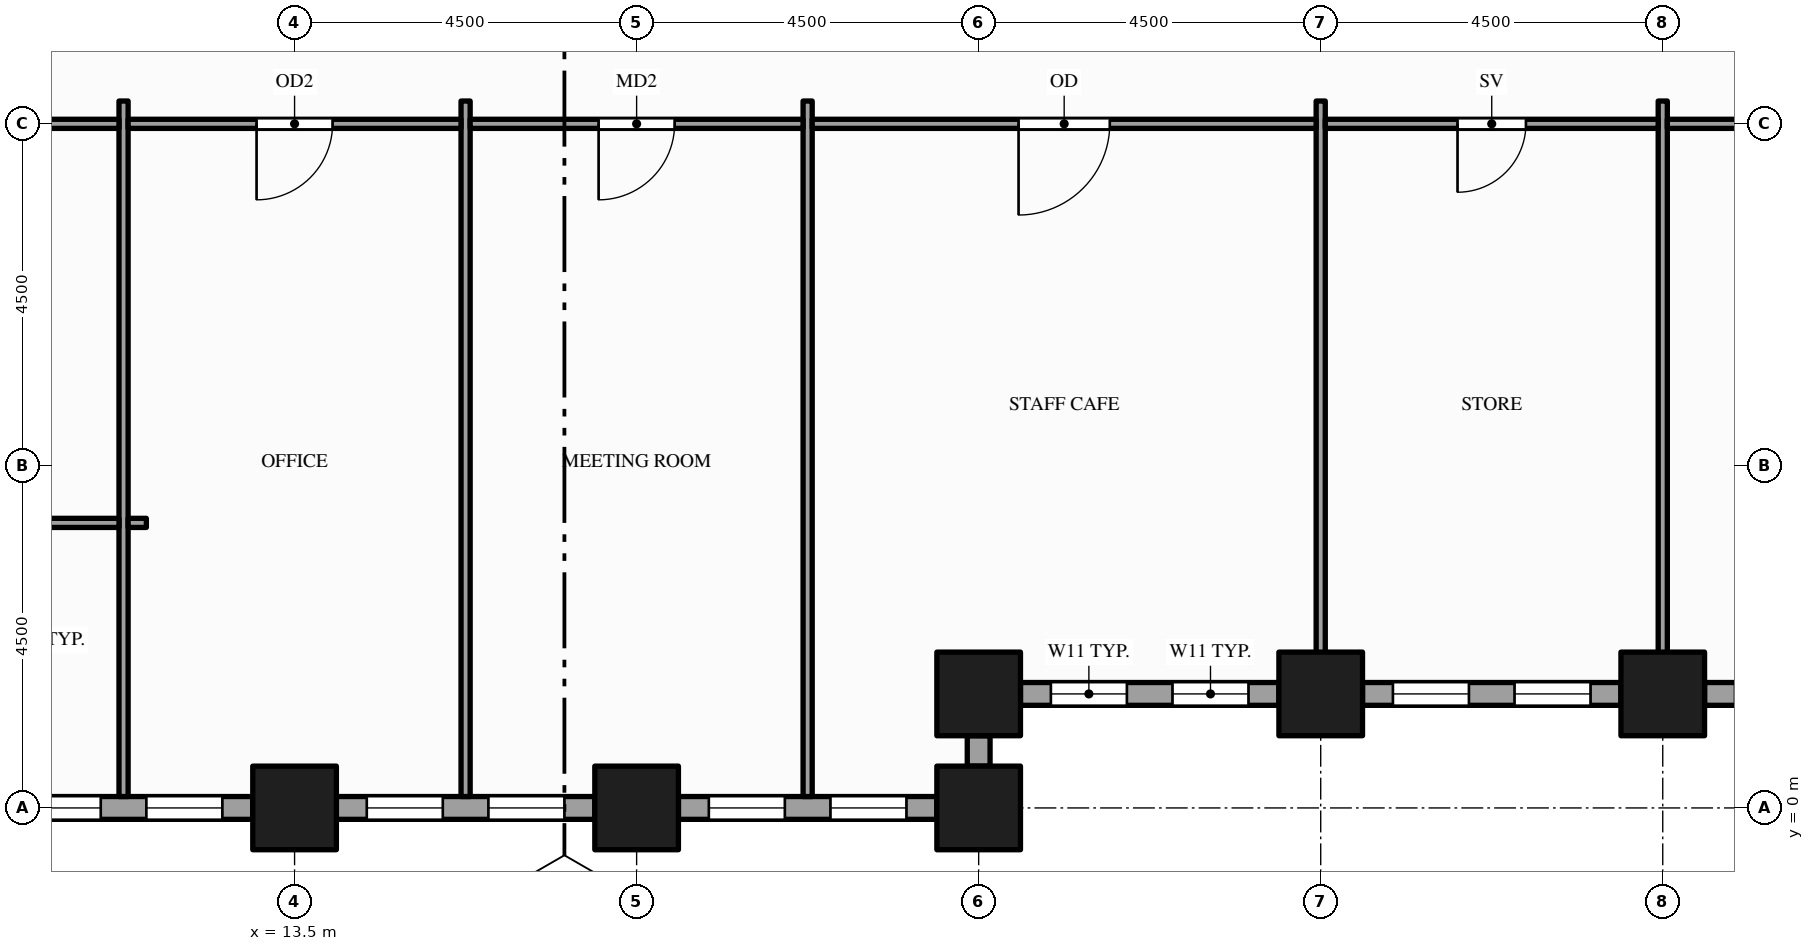
"""IFC4 building model, lengths in metres.
Left out: names, types, materials, properties, quantities, classifications, styles, units other than length and angle.
Written with IfcOpenShell. Run it as: python <this file> out.ifc"""

import sys

from ifc_helpers import new_model, si_unit, direction, frame, frame_2d, origin, origin_2d, place, context, subcontext, project, spatial, rectangle, hollow_rectangle, extrude, element, fill, save


model = new_model("IFC4")
c1 = context("Model", 3, precision=1e-05, world=origin(), true_north=direction((0.0, 1.0)))
c2 = subcontext(c1, "Body", "Model", "MODEL_VIEW")
j1 = project(units=[si_unit("LENGTHUNIT", "METRE"), si_unit("PLANEANGLEUNIT", "RADIAN")], contexts=[c1])
p1 = place(None, origin())
s1 = spatial("IfcSite", under=j1, at=p1, CompositionType="ELEMENT")
p2 = place(p1, origin())
s2 = spatial("IfcBuilding", under=s1, at=p2, CompositionType="ELEMENT")
p3 = place(p2, frame((0.0, 0.0, 73.0)))
s3 = spatial("IfcBuildingStorey", under=s2, at=p3, CompositionType="ELEMENT", Elevation=73.0)
for number, where, z_axis, x_axis in (
    (1, (13.5, 0.0, -0.15), (0.0, 0.0, 1.0), (1.0, 0.0, 0.0)),
    (2, (18.0, 0.0, -0.15), (0.0, 0.0, 1.0), (1.0, 0.0, 0.0)),
    (3, (22.5, 0.0, -0.15), (0.0, 0.0, 1.0), (1.0, 0.0, 0.0)),
    (4, (22.5, 1.5, -0.15), (0.0, 0.0, 1.0), (1.0, 0.0, 0.0)),
    (5, (27.0, 1.5, -0.15), (0.0, 0.0, 1.0), (1.0, 0.0, 0.0)),
    (6, (31.5, 1.5, -0.15), (0.0, 0.0, 1.0), (1.0, 0.0, 0.0)),
):
    element("IfcColumn", number, at=place(p3, frame(where, z_axis=z_axis, x_axis=x_axis)), inside=s3, PredefinedType="COLUMN", context=c2, shape_type="SweptSolid", body=[
        extrude(hollow_rectangle(XDim=1.1, YDim=1.1, WallThickness=0.06, at=origin_2d()), origin(), (0.0, 0.0, 1.0), 3.9),
    ])
p4 = place(p3, frame((9.55, 0.0, 0.0), z_axis=(0.0, 0.0, 1.0), x_axis=(1.0, 0.0, 0.0)))
e7 = element("IfcWall", 7, at=p4, inside=s3, PredefinedType="STANDARD", context=c2, shape_type="SweptSolid", body=[
    extrude(rectangle(XDim=3.4, YDim=0.3, at=frame_2d((1.7, 0.0))), origin(), (0.0, 0.0, 1.0), 3.044),
])
p5 = place(p4, frame((0.4, 0.0, 0.9)))
e8 = element("IfcOpeningElement", 8, at=p5, cuts=e7, PredefinedType="OPENING", context=c2, shape_type="SweptSolid", body=[
    extrude(rectangle(XDim=1.0, YDim=2.0, at=frame_2d((0.5, 1.0))), frame((0.0, 0.16, 0.0), z_axis=(0.0, -1.0, 0.0), x_axis=(1.0, 0.0, 0.0)), (0.0, 0.0, 1.0), 0.32),
])
p6 = place(p4, frame((2.0, 0.0, 0.9)))
e9 = element("IfcOpeningElement", 9, at=p6, cuts=e7, PredefinedType="OPENING", context=c2, shape_type="SweptSolid", body=[
    extrude(rectangle(XDim=1.0, YDim=2.0, at=frame_2d((0.5, 1.0))), frame((0.0, 0.16, 0.0), z_axis=(0.0, -1.0, 0.0), x_axis=(1.0, 0.0, 0.0)), (0.0, 0.0, 1.0), 0.32),
])
p7 = place(p3, frame((14.05, 0.0, 0.0), z_axis=(0.0, 0.0, 1.0), x_axis=(1.0, 0.0, 0.0)))
e10 = element("IfcWall", 10, at=p7, inside=s3, PredefinedType="STANDARD", context=c2, shape_type="SweptSolid", body=[
    extrude(rectangle(XDim=3.4, YDim=0.3, at=frame_2d((1.7, 0.0))), origin(), (0.0, 0.0, 1.0), 3.044),
])
p8 = place(p7, frame((0.4, 0.0, 0.9)))
e11 = element("IfcOpeningElement", 11, at=p8, cuts=e10, PredefinedType="OPENING", context=c2, shape_type="SweptSolid", body=[
    extrude(rectangle(XDim=1.0, YDim=2.0, at=frame_2d((0.5, 1.0))), frame((0.0, 0.16, 0.0), z_axis=(0.0, -1.0, 0.0), x_axis=(1.0, 0.0, 0.0)), (0.0, 0.0, 1.0), 0.32),
])
p9 = place(p7, frame((2.0, 0.0, 0.9)))
e12 = element("IfcOpeningElement", 12, at=p9, cuts=e10, PredefinedType="OPENING", context=c2, shape_type="SweptSolid", body=[
    extrude(rectangle(XDim=1.0, YDim=2.0, at=frame_2d((0.5, 1.0))), frame((0.0, 0.16, 0.0), z_axis=(0.0, -1.0, 0.0), x_axis=(1.0, 0.0, 0.0)), (0.0, 0.0, 1.0), 0.32),
])
p10 = place(p3, frame((18.55, 0.0, 0.0), z_axis=(0.0, 0.0, 1.0), x_axis=(1.0, 0.0, 0.0)))
e13 = element("IfcWall", 13, at=p10, inside=s3, PredefinedType="STANDARD", context=c2, shape_type="SweptSolid", body=[
    extrude(rectangle(XDim=3.4, YDim=0.3, at=frame_2d((1.7, 0.0))), origin(), (0.0, 0.0, 1.0), 3.044),
])
p11 = place(p10, frame((0.4, 0.0, 0.9)))
e14 = element("IfcOpeningElement", 14, at=p11, cuts=e13, PredefinedType="OPENING", context=c2, shape_type="SweptSolid", body=[
    extrude(rectangle(XDim=1.0, YDim=2.0, at=frame_2d((0.5, 1.0))), frame((0.0, 0.16, 0.0), z_axis=(0.0, -1.0, 0.0), x_axis=(1.0, 0.0, 0.0)), (0.0, 0.0, 1.0), 0.32),
])
p12 = place(p10, frame((2.0, 0.0, 0.9)))
e15 = element("IfcOpeningElement", 15, at=p12, cuts=e13, PredefinedType="OPENING", context=c2, shape_type="SweptSolid", body=[
    extrude(rectangle(XDim=1.0, YDim=2.0, at=frame_2d((0.5, 1.0))), frame((0.0, 0.16, 0.0), z_axis=(0.0, -1.0, 0.0), x_axis=(1.0, 0.0, 0.0)), (0.0, 0.0, 1.0), 0.32),
])
p13 = place(p3, frame((22.5, 0.55, 0.0), z_axis=(0.0, 0.0, 1.0), x_axis=(0.0, 1.0, 0.0)))
e16 = element("IfcWall", 16, at=p13, inside=s3, PredefinedType="STANDARD", context=c2, shape_type="SweptSolid", body=[
    extrude(rectangle(XDim=0.4, YDim=0.3, at=frame_2d((0.2, 0.0))), origin(), (0.0, 0.0, 1.0), 3.044),
])
p14 = place(p3, frame((23.05, 1.5, 0.0), z_axis=(0.0, 0.0, 1.0), x_axis=(1.0, 0.0, 0.0)))
e17 = element("IfcWall", 17, at=p14, inside=s3, PredefinedType="STANDARD", context=c2, shape_type="SweptSolid", body=[
    extrude(rectangle(XDim=3.4, YDim=0.3, at=frame_2d((1.7, 0.0))), origin(), (0.0, 0.0, 1.0), 2.838),
])
p15 = place(p14, frame((0.4, 0.0, 0.9)))
e18 = element("IfcOpeningElement", 18, at=p15, cuts=e17, PredefinedType="OPENING", context=c2, shape_type="SweptSolid", body=[
    extrude(rectangle(XDim=1.0, YDim=1.75, at=frame_2d((0.5, 0.875))), frame((0.0, 0.16, 0.0), z_axis=(0.0, -1.0, 0.0), x_axis=(1.0, 0.0, 0.0)), (0.0, 0.0, 1.0), 0.32),
])
p16 = place(p14, frame((2.0, 0.0, 0.9)))
e19 = element("IfcOpeningElement", 19, at=p16, cuts=e17, PredefinedType="OPENING", context=c2, shape_type="SweptSolid", body=[
    extrude(rectangle(XDim=1.0, YDim=1.75, at=frame_2d((0.5, 0.875))), frame((0.0, 0.16, 0.0), z_axis=(0.0, -1.0, 0.0), x_axis=(1.0, 0.0, 0.0)), (0.0, 0.0, 1.0), 0.32),
])
p17 = place(p3, frame((27.55, 1.5, 0.0), z_axis=(0.0, 0.0, 1.0), x_axis=(1.0, 0.0, 0.0)))
e20 = element("IfcWall", 20, at=p17, inside=s3, PredefinedType="STANDARD", context=c2, shape_type="SweptSolid", body=[
    extrude(rectangle(XDim=3.4, YDim=0.3, at=frame_2d((1.7, 0.0))), origin(), (0.0, 0.0, 1.0), 2.838),
])
p18 = place(p17, frame((0.4, 0.0, 0.9)))
e21 = element("IfcOpeningElement", 21, at=p18, cuts=e20, PredefinedType="OPENING", context=c2, shape_type="SweptSolid", body=[
    extrude(rectangle(XDim=1.0, YDim=1.75, at=frame_2d((0.5, 0.875))), frame((0.0, 0.16, 0.0), z_axis=(0.0, -1.0, 0.0), x_axis=(1.0, 0.0, 0.0)), (0.0, 0.0, 1.0), 0.32),
])
p19 = place(p17, frame((2.0, 0.0, 0.9)))
e22 = element("IfcOpeningElement", 22, at=p19, cuts=e20, PredefinedType="OPENING", context=c2, shape_type="SweptSolid", body=[
    extrude(rectangle(XDim=1.0, YDim=1.75, at=frame_2d((0.5, 0.875))), frame((0.0, 0.16, 0.0), z_axis=(0.0, -1.0, 0.0), x_axis=(1.0, 0.0, 0.0)), (0.0, 0.0, 1.0), 0.32),
])
p20 = place(p3, frame((32.05, 1.5, 0.0), z_axis=(0.0, 0.0, 1.0), x_axis=(1.0, 0.0, 0.0)))
e23 = element("IfcWall", 23, at=p20, inside=s3, PredefinedType="STANDARD", context=c2, shape_type="SweptSolid", body=[
    extrude(rectangle(XDim=3.4, YDim=0.3, at=frame_2d((1.7, 0.0))), origin(), (0.0, 0.0, 1.0), 2.838),
])
p21 = place(p20, frame((0.4, 0.0, 0.9)))
e24 = element("IfcOpeningElement", 24, at=p21, cuts=e23, PredefinedType="OPENING", context=c2, shape_type="SweptSolid", body=[
    extrude(rectangle(XDim=1.0, YDim=1.75, at=frame_2d((0.5, 0.875))), frame((0.0, 0.16, 0.0), z_axis=(0.0, -1.0, 0.0), x_axis=(1.0, 0.0, 0.0)), (0.0, 0.0, 1.0), 0.32),
])
p22 = place(p20, frame((2.0, 0.0, 0.9)))
e25 = element("IfcOpeningElement", 25, at=p22, cuts=e23, PredefinedType="OPENING", context=c2, shape_type="SweptSolid", body=[
    extrude(rectangle(XDim=1.0, YDim=1.75, at=frame_2d((0.5, 0.875))), frame((0.0, 0.16, 0.0), z_axis=(0.0, -1.0, 0.0), x_axis=(1.0, 0.0, 0.0)), (0.0, 0.0, 1.0), 0.32),
])
for number, where, z_axis, x_axis in (
    (26, (11.25, 0.15, 0.0), (0.0, 0.0, 1.0), (0.0, 1.0, 0.0)),
    (27, (15.75, 0.15, 0.0), (0.0, 0.0, 1.0), (0.0, 1.0, 0.0)),
    (28, (20.25, 0.15, 0.0), (0.0, 0.0, 1.0), (0.0, 1.0, 0.0)),
):
    element("IfcWall", number, at=place(p3, frame(where, z_axis=z_axis, x_axis=x_axis)), inside=s3, PredefinedType="PARTITIONING", context=c2, shape_type="SweptSolid", body=[
        extrude(rectangle(XDim=9.15, YDim=0.12, at=frame_2d((4.575, 0.0))), origin(), (0.0, 0.0, 1.0), 2.838),
    ])
for number, where, z_axis, x_axis in (
    (29, (27.0, 1.65, 0.0), (0.0, 0.0, 1.0), (0.0, 1.0, 0.0)),
    (30, (31.5, 1.65, 0.0), (0.0, 0.0, 1.0), (0.0, 1.0, 0.0)),
):
    element("IfcWall", number, at=place(p3, frame(where, z_axis=z_axis, x_axis=x_axis)), inside=s3, PredefinedType="PARTITIONING", context=c2, shape_type="SweptSolid", body=[
        extrude(rectangle(XDim=7.65, YDim=0.12, at=frame_2d((3.825, 0.0))), origin(), (0.0, 0.0, 1.0), 2.838),
    ])
p23 = place(p3, frame((9.125, 3.75, 0.0), z_axis=(0.0, 0.0, 1.0), x_axis=(1.0, 0.0, 0.0)))
e31 = element("IfcWall", 31, at=p23, inside=s3, PredefinedType="PARTITIONING", context=c2, shape_type="SweptSolid", body=[
    extrude(rectangle(XDim=2.065, YDim=0.12, at=frame_2d((1.032, 0.0))), origin(), (0.0, 0.0, 1.0), 2.838),
])
p24 = place(p3, frame((11.31, 3.75, 0.0), z_axis=(0.0, 0.0, 1.0), x_axis=(1.0, 0.0, 0.0)))
e32 = element("IfcWall", 32, at=p24, inside=s3, PredefinedType="PARTITIONING", context=c2, shape_type="SweptSolid", body=[
    extrude(rectangle(XDim=0.24, YDim=0.12, at=frame_2d((0.12, 0.0))), origin(), (0.0, 0.0, 1.0), 2.838),
])
p25 = place(p3, frame((0.15, 9.0, 0.0), z_axis=(0.0, 0.0, 1.0), x_axis=(1.0, 0.0, 0.0)))
e33 = element("IfcWall", 33, at=p25, inside=s3, PredefinedType="PARTITIONING", context=c2, shape_type="SweptSolid", body=[
    extrude(rectangle(XDim=11.04, YDim=0.12, at=frame_2d((5.52, 0.0))), origin(), (0.0, 0.0, 1.0), 2.838),
])
p26 = place(p25, frame((4.93, 0.0, 0.0)))
e34 = element("IfcOpeningElement", 34, at=p26, cuts=e33, PredefinedType="OPENING", context=c2, shape_type="SweptSolid", body=[
    extrude(rectangle(XDim=1.2, YDim=2.1, at=frame_2d((0.6, 1.05))), frame((0.0, 0.07, 0.0), z_axis=(0.0, -1.0, 0.0), x_axis=(1.0, 0.0, 0.0)), (0.0, 0.0, 1.0), 0.14),
])
p27 = place(p3, frame((11.31, 9.0, 0.0), z_axis=(0.0, 0.0, 1.0), x_axis=(1.0, 0.0, 0.0)))
e35 = element("IfcWall", 35, at=p27, inside=s3, PredefinedType="PARTITIONING", context=c2, shape_type="SweptSolid", body=[
    extrude(rectangle(XDim=4.38, YDim=0.12, at=frame_2d((2.19, 0.0))), origin(), (0.0, 0.0, 1.0), 2.838),
])
p28 = place(p27, frame((1.69, 0.0, 0.0)))
e36 = element("IfcOpeningElement", 36, at=p28, cuts=e35, PredefinedType="OPENING", context=c2, shape_type="SweptSolid", body=[
    extrude(rectangle(XDim=1.0, YDim=2.1, at=frame_2d((0.5, 1.05))), frame((0.0, 0.07, 0.0), z_axis=(0.0, -1.0, 0.0), x_axis=(1.0, 0.0, 0.0)), (0.0, 0.0, 1.0), 0.14),
])
p29 = place(p3, frame((15.81, 9.0, 0.0), z_axis=(0.0, 0.0, 1.0), x_axis=(1.0, 0.0, 0.0)))
e37 = element("IfcWall", 37, at=p29, inside=s3, PredefinedType="PARTITIONING", context=c2, shape_type="SweptSolid", body=[
    extrude(rectangle(XDim=4.38, YDim=0.12, at=frame_2d((2.19, 0.0))), origin(), (0.0, 0.0, 1.0), 2.838),
])
p30 = place(p29, frame((1.69, 0.0, 0.0)))
e38 = element("IfcOpeningElement", 38, at=p30, cuts=e37, PredefinedType="OPENING", context=c2, shape_type="SweptSolid", body=[
    extrude(rectangle(XDim=1.0, YDim=2.1, at=frame_2d((0.5, 1.05))), frame((0.0, 0.07, 0.0), z_axis=(0.0, -1.0, 0.0), x_axis=(1.0, 0.0, 0.0)), (0.0, 0.0, 1.0), 0.14),
])
p31 = place(p3, frame((20.31, 9.0, 0.0), z_axis=(0.0, 0.0, 1.0), x_axis=(1.0, 0.0, 0.0)))
e39 = element("IfcWall", 39, at=p31, inside=s3, PredefinedType="PARTITIONING", context=c2, shape_type="SweptSolid", body=[
    extrude(rectangle(XDim=6.63, YDim=0.12, at=frame_2d((3.315, 0.0))), origin(), (0.0, 0.0, 1.0), 2.838),
])
p32 = place(p31, frame((2.715, 0.0, 0.0)))
e40 = element("IfcOpeningElement", 40, at=p32, cuts=e39, PredefinedType="OPENING", context=c2, shape_type="SweptSolid", body=[
    extrude(rectangle(XDim=1.2, YDim=2.1, at=frame_2d((0.6, 1.05))), frame((0.0, 0.07, 0.0), z_axis=(0.0, -1.0, 0.0), x_axis=(1.0, 0.0, 0.0)), (0.0, 0.0, 1.0), 0.14),
])
p33 = place(p3, frame((27.06, 9.0, 0.0), z_axis=(0.0, 0.0, 1.0), x_axis=(1.0, 0.0, 0.0)))
e41 = element("IfcWall", 41, at=p33, inside=s3, PredefinedType="PARTITIONING", context=c2, shape_type="SweptSolid", body=[
    extrude(rectangle(XDim=4.38, YDim=0.12, at=frame_2d((2.19, 0.0))), origin(), (0.0, 0.0, 1.0), 2.838),
])
p34 = place(p33, frame((1.74, 0.0, 0.0)))
e42 = element("IfcOpeningElement", 42, at=p34, cuts=e41, PredefinedType="OPENING", context=c2, shape_type="SweptSolid", body=[
    extrude(rectangle(XDim=0.9, YDim=2.1, at=frame_2d((0.45, 1.05))), frame((0.0, 0.07, 0.0), z_axis=(0.0, -1.0, 0.0), x_axis=(1.0, 0.0, 0.0)), (0.0, 0.0, 1.0), 0.14),
])
p35 = place(p3, frame((31.56, 9.0, 0.0), z_axis=(0.0, 0.0, 1.0), x_axis=(1.0, 0.0, 0.0)))
e43 = element("IfcWall", 43, at=p35, inside=s3, PredefinedType="PARTITIONING", context=c2, shape_type="SweptSolid", body=[
    extrude(rectangle(XDim=6.63, YDim=0.12, at=frame_2d((3.315, 0.0))), origin(), (0.0, 0.0, 1.0), 2.838),
])
p36 = place(p35, frame((2.865, 0.0, 0.0)))
e44 = element("IfcOpeningElement", 44, at=p36, cuts=e43, PredefinedType="OPENING", context=c2, shape_type="SweptSolid", body=[
    extrude(rectangle(XDim=0.9, YDim=2.1, at=frame_2d((0.45, 1.05))), frame((0.0, 0.07, 0.0), z_axis=(0.0, -1.0, 0.0), x_axis=(1.0, 0.0, 0.0)), (0.0, 0.0, 1.0), 0.14),
])
p37 = place(p5, origin())
e45 = element("IfcWindow", 45, at=p37, inside=s3, PartitioningType="SINGLE_PANEL", PredefinedType="WINDOW", context=c2, shape_type="SweptSolid", body=[
    extrude(rectangle(XDim=1.0, YDim=2.0, at=frame_2d((0.5, 1.0))), frame((0.0, 0.03, 0.0), z_axis=(0.0, -1.0, 0.0), x_axis=(1.0, 0.0, 0.0)), (0.0, 0.0, 1.0), 0.06),
])
fill(e8, e45)
p38 = place(p6, origin())
e46 = element("IfcWindow", 46, at=p38, inside=s3, PartitioningType="SINGLE_PANEL", PredefinedType="WINDOW", context=c2, shape_type="SweptSolid", body=[
    extrude(rectangle(XDim=1.0, YDim=2.0, at=frame_2d((0.5, 1.0))), frame((0.0, 0.03, 0.0), z_axis=(0.0, -1.0, 0.0), x_axis=(1.0, 0.0, 0.0)), (0.0, 0.0, 1.0), 0.06),
])
fill(e9, e46)
p39 = place(p8, origin())
e47 = element("IfcWindow", 47, at=p39, inside=s3, PartitioningType="SINGLE_PANEL", PredefinedType="WINDOW", context=c2, shape_type="SweptSolid", body=[
    extrude(rectangle(XDim=1.0, YDim=2.0, at=frame_2d((0.5, 1.0))), frame((0.0, 0.03, 0.0), z_axis=(0.0, -1.0, 0.0), x_axis=(1.0, 0.0, 0.0)), (0.0, 0.0, 1.0), 0.06),
])
fill(e11, e47)
p40 = place(p9, origin())
e48 = element("IfcWindow", 48, at=p40, inside=s3, PartitioningType="SINGLE_PANEL", PredefinedType="WINDOW", context=c2, shape_type="SweptSolid", body=[
    extrude(rectangle(XDim=1.0, YDim=2.0, at=frame_2d((0.5, 1.0))), frame((0.0, 0.03, 0.0), z_axis=(0.0, -1.0, 0.0), x_axis=(1.0, 0.0, 0.0)), (0.0, 0.0, 1.0), 0.06),
])
fill(e12, e48)
p41 = place(p11, origin())
e49 = element("IfcWindow", 49, at=p41, inside=s3, PartitioningType="SINGLE_PANEL", PredefinedType="WINDOW", context=c2, shape_type="SweptSolid", body=[
    extrude(rectangle(XDim=1.0, YDim=2.0, at=frame_2d((0.5, 1.0))), frame((0.0, 0.03, 0.0), z_axis=(0.0, -1.0, 0.0), x_axis=(1.0, 0.0, 0.0)), (0.0, 0.0, 1.0), 0.06),
])
fill(e14, e49)
p42 = place(p12, origin())
e50 = element("IfcWindow", 50, at=p42, inside=s3, PartitioningType="SINGLE_PANEL", PredefinedType="WINDOW", context=c2, shape_type="SweptSolid", body=[
    extrude(rectangle(XDim=1.0, YDim=2.0, at=frame_2d((0.5, 1.0))), frame((0.0, 0.03, 0.0), z_axis=(0.0, -1.0, 0.0), x_axis=(1.0, 0.0, 0.0)), (0.0, 0.0, 1.0), 0.06),
])
fill(e15, e50)
p43 = place(p15, origin())
e51 = element("IfcWindow", 51, at=p43, inside=s3, PartitioningType="SINGLE_PANEL", PredefinedType="WINDOW", context=c2, shape_type="SweptSolid", body=[
    extrude(rectangle(XDim=1.0, YDim=1.75, at=frame_2d((0.5, 0.875))), frame((0.0, 0.03, 0.0), z_axis=(0.0, -1.0, 0.0), x_axis=(1.0, 0.0, 0.0)), (0.0, 0.0, 1.0), 0.06),
])
fill(e18, e51)
p44 = place(p16, origin())
e52 = element("IfcWindow", 52, at=p44, inside=s3, PartitioningType="SINGLE_PANEL", PredefinedType="WINDOW", context=c2, shape_type="SweptSolid", body=[
    extrude(rectangle(XDim=1.0, YDim=1.75, at=frame_2d((0.5, 0.875))), frame((0.0, 0.03, 0.0), z_axis=(0.0, -1.0, 0.0), x_axis=(1.0, 0.0, 0.0)), (0.0, 0.0, 1.0), 0.06),
])
fill(e19, e52)
p45 = place(p18, origin())
e53 = element("IfcWindow", 53, at=p45, inside=s3, PartitioningType="SINGLE_PANEL", PredefinedType="WINDOW", context=c2, shape_type="SweptSolid", body=[
    extrude(rectangle(XDim=1.0, YDim=1.75, at=frame_2d((0.5, 0.875))), frame((0.0, 0.03, 0.0), z_axis=(0.0, -1.0, 0.0), x_axis=(1.0, 0.0, 0.0)), (0.0, 0.0, 1.0), 0.06),
])
fill(e21, e53)
p46 = place(p19, origin())
e54 = element("IfcWindow", 54, at=p46, inside=s3, PartitioningType="SINGLE_PANEL", PredefinedType="WINDOW", context=c2, shape_type="SweptSolid", body=[
    extrude(rectangle(XDim=1.0, YDim=1.75, at=frame_2d((0.5, 0.875))), frame((0.0, 0.03, 0.0), z_axis=(0.0, -1.0, 0.0), x_axis=(1.0, 0.0, 0.0)), (0.0, 0.0, 1.0), 0.06),
])
fill(e22, e54)
p47 = place(p28, origin())
e55 = element("IfcDoor", 55, at=p47, inside=s3, OperationType="SINGLE_SWING_LEFT", PredefinedType="DOOR", context=c2, shape_type="SweptSolid", body=[
    extrude(rectangle(XDim=1.0, YDim=2.1, at=frame_2d((0.5, 1.05))), frame((0.0, 0.025, 0.0), z_axis=(0.0, -1.0, 0.0), x_axis=(1.0, 0.0, 0.0)), (0.0, 0.0, 1.0), 0.05),
])
fill(e36, e55)
p48 = place(p30, origin())
e56 = element("IfcDoor", 56, at=p48, inside=s3, OperationType="SINGLE_SWING_LEFT", PredefinedType="DOOR", context=c2, shape_type="SweptSolid", body=[
    extrude(rectangle(XDim=1.0, YDim=2.1, at=frame_2d((0.5, 1.05))), frame((0.0, 0.025, 0.0), z_axis=(0.0, -1.0, 0.0), x_axis=(1.0, 0.0, 0.0)), (0.0, 0.0, 1.0), 0.05),
])
fill(e38, e56)
p49 = place(p32, origin())
e57 = element("IfcDoor", 57, at=p49, inside=s3, OperationType="SINGLE_SWING_LEFT", PredefinedType="DOOR", context=c2, shape_type="SweptSolid", body=[
    extrude(rectangle(XDim=1.2, YDim=2.1, at=frame_2d((0.6, 1.05))), frame((0.0, 0.025, 0.0), z_axis=(0.0, -1.0, 0.0), x_axis=(1.0, 0.0, 0.0)), (0.0, 0.0, 1.0), 0.05),
])
fill(e40, e57)
p50 = place(p34, origin())
e58 = element("IfcDoor", 58, at=p50, inside=s3, OperationType="SINGLE_SWING_LEFT", PredefinedType="DOOR", context=c2, shape_type="SweptSolid", body=[
    extrude(rectangle(XDim=0.9, YDim=2.1, at=frame_2d((0.45, 1.05))), frame((0.0, 0.025, 0.0), z_axis=(0.0, -1.0, 0.0), x_axis=(1.0, 0.0, 0.0)), (0.0, 0.0, 1.0), 0.05),
])
fill(e42, e58)
save(model, sys.argv[1])
